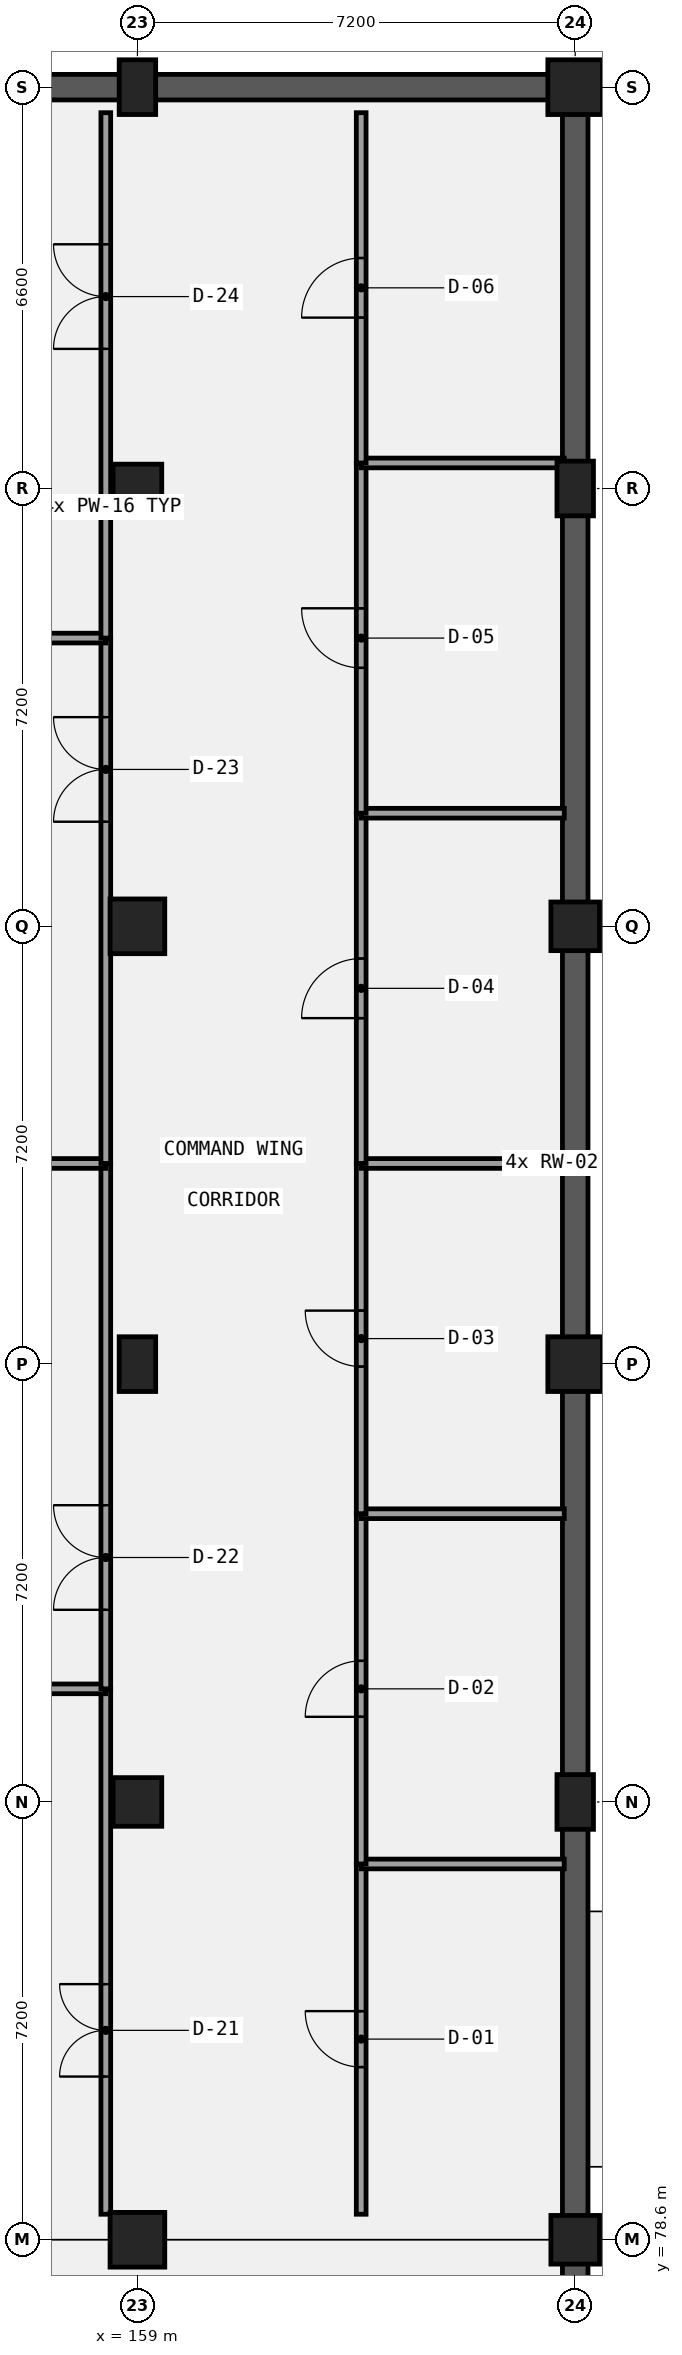
"""IFC4 building model, lengths in metres.
Left out: names, types, materials, properties, quantities, classifications, styles, units other than length and angle.
Written with IfcOpenShell. Run it as: python <this file> out.ifc"""

import sys

from ifc_helpers import new_model, si_unit, direction, frame, frame_2d, origin, origin_2d, place, context, subcontext, project, spatial, rectangle, extrude, element, fill, save


model = new_model("IFC4")
c1 = context("Model", 3, precision=1e-05, world=origin(), true_north=direction((0.0, 1.0)))
c2 = subcontext(c1, "Body", "Model", "MODEL_VIEW")
j1 = project(units=[si_unit("LENGTHUNIT", "METRE"), si_unit("PLANEANGLEUNIT", "RADIAN")], contexts=[c1])
p1 = place(None, origin())
s1 = spatial("IfcSite", under=j1, at=p1, CompositionType="ELEMENT")
p2 = place(p1, origin())
s2 = spatial("IfcBuilding", under=s1, at=p2, CompositionType="ELEMENT")
p3 = place(p2, frame((0.0, 0.0, -4.2)))
s3 = spatial("IfcBuildingStorey", under=s2, at=p3, CompositionType="ELEMENT", Elevation=-4.2)
p4 = place(p3, frame((144.39, 114.0, 0.0), z_axis=(0.0, 0.0, 1.0), x_axis=(1.0, 0.0, 0.0)))
e1 = element("IfcWall", 1, at=p4, inside=s3, PredefinedType="USERDEFINED", context=c2, shape_type="SweptSolid", body=[
    extrude(rectangle(XDim=22.02, YDim=0.42, at=frame_2d((11.01, 0.0))), origin(), (0.0, 0.0, 1.0), 3.13),
])
p5 = place(p3, frame((166.2, 113.8, 0.0), z_axis=(0.0, 0.0, 1.0), x_axis=(0.0, -1.0, 0.0)))
e2 = element("IfcWall", 2, at=p5, inside=s3, PredefinedType="USERDEFINED", context=c2, shape_type="SweptSolid", body=[
    extrude(rectangle(XDim=35.0, YDim=0.42, at=frame_2d((17.5, 0.0))), origin(), (0.0, 0.0, 1.0), 3.03),
])
p6 = place(p3, frame((166.2, 78.4, 0.0), z_axis=(0.0, 0.0, 1.0), x_axis=(0.0, -1.0, 0.0)))
e3 = element("IfcWall", 3, at=p6, inside=s3, PredefinedType="USERDEFINED", context=c2, shape_type="SweptSolid", body=[
    extrude(rectangle(XDim=28.37, YDim=0.42, at=frame_2d((14.185, 0.0))), origin(), (0.0, 0.0, 1.0), 2.88),
])
p7 = place(p3, frame((159.0, 78.6, 0.0), z_axis=(0.0, 0.0, 1.0), x_axis=(1.0, 0.0, 0.0)))
e4 = element("IfcColumn", 4, at=p7, inside=s3, PredefinedType="COLUMN", context=c2, shape_type="SweptSolid", body=[
    extrude(rectangle(XDim=0.9, YDim=0.9, at=origin_2d()), origin(), (0.0, 0.0, 1.0), 4.2),
])
p8 = place(p3, frame((159.0, 85.8, 0.0), z_axis=(0.0, 0.0, 1.0), x_axis=(1.0, 0.0, 0.0)))
e5 = element("IfcColumn", 5, at=p8, inside=s3, PredefinedType="COLUMN", context=c2, shape_type="SweptSolid", body=[
    extrude(rectangle(XDim=0.8, YDim=0.8, at=origin_2d()), origin(), (0.0, 0.0, 1.0), 4.2),
])
p9 = place(p3, frame((159.0, 93.0, 0.0), z_axis=(0.0, 0.0, 1.0), x_axis=(1.0, 0.0, 0.0)))
e6 = element("IfcColumn", 6, at=p9, inside=s3, PredefinedType="COLUMN", context=c2, shape_type="SweptSolid", body=[
    extrude(rectangle(XDim=0.6, YDim=0.9, at=origin_2d()), origin(), (0.0, 0.0, 1.0), 4.2),
])
p10 = place(p3, frame((159.0, 100.2, 0.0), z_axis=(0.0, 0.0, 1.0), x_axis=(1.0, 0.0, 0.0)))
e7 = element("IfcColumn", 7, at=p10, inside=s3, PredefinedType="COLUMN", context=c2, shape_type="SweptSolid", body=[
    extrude(rectangle(XDim=0.9, YDim=0.9, at=origin_2d()), origin(), (0.0, 0.0, 1.0), 4.2),
])
p11 = place(p3, frame((159.0, 107.4, 0.0), z_axis=(0.0, 0.0, 1.0), x_axis=(1.0, 0.0, 0.0)))
e8 = element("IfcColumn", 8, at=p11, inside=s3, PredefinedType="COLUMN", context=c2, shape_type="SweptSolid", body=[
    extrude(rectangle(XDim=0.8, YDim=0.8, at=origin_2d()), origin(), (0.0, 0.0, 1.0), 4.2),
])
p12 = place(p3, frame((159.0, 114.0, 0.0), z_axis=(0.0, 0.0, 1.0), x_axis=(1.0, 0.0, 0.0)))
e9 = element("IfcColumn", 9, at=p12, inside=s3, PredefinedType="COLUMN", context=c2, shape_type="SweptSolid", body=[
    extrude(rectangle(XDim=0.6, YDim=0.9, at=origin_2d()), origin(), (0.0, 0.0, 1.0), 4.2),
])
p13 = place(p3, frame((166.2, 78.6, 0.0), z_axis=(0.0, 0.0, 1.0), x_axis=(1.0, 0.0, 0.0)))
e10 = element("IfcColumn", 10, at=p13, inside=s3, PredefinedType="COLUMN", context=c2, shape_type="SweptSolid", body=[
    extrude(rectangle(XDim=0.8, YDim=0.8, at=origin_2d()), origin(), (0.0, 0.0, 1.0), 4.2),
])
p14 = place(p3, frame((166.2, 85.8, 0.0), z_axis=(0.0, 0.0, 1.0), x_axis=(1.0, 0.0, 0.0)))
e11 = element("IfcColumn", 11, at=p14, inside=s3, PredefinedType="COLUMN", context=c2, shape_type="SweptSolid", body=[
    extrude(rectangle(XDim=0.6, YDim=0.9, at=origin_2d()), origin(), (0.0, 0.0, 1.0), 4.2),
])
p15 = place(p3, frame((166.2, 93.0, 0.0), z_axis=(0.0, 0.0, 1.0), x_axis=(1.0, 0.0, 0.0)))
e12 = element("IfcColumn", 12, at=p15, inside=s3, PredefinedType="COLUMN", context=c2, shape_type="SweptSolid", body=[
    extrude(rectangle(XDim=0.9, YDim=0.9, at=origin_2d()), origin(), (0.0, 0.0, 1.0), 4.2),
])
p16 = place(p3, frame((166.2, 100.2, 0.0), z_axis=(0.0, 0.0, 1.0), x_axis=(1.0, 0.0, 0.0)))
e13 = element("IfcColumn", 13, at=p16, inside=s3, PredefinedType="COLUMN", context=c2, shape_type="SweptSolid", body=[
    extrude(rectangle(XDim=0.8, YDim=0.8, at=origin_2d()), origin(), (0.0, 0.0, 1.0), 4.2),
])
p17 = place(p3, frame((166.2, 107.4, 0.0), z_axis=(0.0, 0.0, 1.0), x_axis=(1.0, 0.0, 0.0)))
e14 = element("IfcColumn", 14, at=p17, inside=s3, PredefinedType="COLUMN", context=c2, shape_type="SweptSolid", body=[
    extrude(rectangle(XDim=0.6, YDim=0.9, at=origin_2d()), origin(), (0.0, 0.0, 1.0), 4.2),
])
p18 = place(p3, frame((166.2, 114.0, 0.0), z_axis=(0.0, 0.0, 1.0), x_axis=(1.0, 0.0, 0.0)))
e15 = element("IfcColumn", 15, at=p18, inside=s3, PredefinedType="COLUMN", context=c2, shape_type="SweptSolid", body=[
    extrude(rectangle(XDim=0.9, YDim=0.9, at=origin_2d()), origin(), (0.0, 0.0, 1.0), 4.2),
])
p19 = place(p3, frame((158.48, 79.02, 0.0), z_axis=(0.0, 0.0, 1.0), x_axis=(0.0, 1.0, 0.0)))
e16 = element("IfcWall", 16, at=p19, inside=s3, PredefinedType="PARTITIONING", context=c2, shape_type="SweptSolid", body=[
    extrude(rectangle(XDim=8.64, YDim=0.16, at=frame_2d((4.32, 0.0))), origin(), (0.0, 0.0, 1.0), 3.88),
])
p20 = place(p19, frame((2.264, 0.0, 0.0)))
e17 = element("IfcOpeningElement", 17, at=p20, cuts=e16, PredefinedType="OPENING", context=c2, shape_type="SweptSolid", body=[
    extrude(rectangle(XDim=1.52, YDim=2.35, at=frame_2d((0.76, 1.175))), frame((0.0, 0.09, 0.0), z_axis=(0.0, -1.0, 0.0), x_axis=(1.0, 0.0, 0.0)), (0.0, 0.0, 1.0), 0.18),
])
p21 = place(p3, frame((145.25, 87.66, 0.0), z_axis=(0.0, 0.0, 1.0), x_axis=(1.0, 0.0, 0.0)))
e18 = element("IfcWall", 18, at=p21, inside=s3, PredefinedType="PARTITIONING", context=c2, shape_type="SweptSolid", body=[
    extrude(rectangle(XDim=13.23, YDim=0.16, at=frame_2d((6.615, 0.0))), origin(), (0.0, 0.0, 1.0), 3.33),
])
p22 = place(p3, frame((158.48, 87.66, 0.0), z_axis=(0.0, 0.0, 1.0), x_axis=(0.0, 1.0, 0.0)))
e19 = element("IfcWall", 19, at=p22, inside=s3, PredefinedType="PARTITIONING", context=c2, shape_type="SweptSolid", body=[
    extrude(rectangle(XDim=8.64, YDim=0.16, at=frame_2d((4.32, 0.0))), origin(), (0.0, 0.0, 1.0), 3.88),
])
p23 = place(p22, frame((1.3, 0.0, 0.0)))
e20 = element("IfcOpeningElement", 20, at=p23, cuts=e19, PredefinedType="OPENING", context=c2, shape_type="SweptSolid", body=[
    extrude(rectangle(XDim=1.72, YDim=2.1, at=frame_2d((0.86, 1.05))), frame((0.0, 0.09, 0.0), z_axis=(0.0, -1.0, 0.0), x_axis=(1.0, 0.0, 0.0)), (0.0, 0.0, 1.0), 0.18),
])
p24 = place(p3, frame((145.25, 96.3, 0.0), z_axis=(0.0, 0.0, 1.0), x_axis=(1.0, 0.0, 0.0)))
e21 = element("IfcWall", 21, at=p24, inside=s3, PredefinedType="PARTITIONING", context=c2, shape_type="SweptSolid", body=[
    extrude(rectangle(XDim=13.23, YDim=0.16, at=frame_2d((6.615, 0.0))), origin(), (0.0, 0.0, 1.0), 3.88),
])
p25 = place(p3, frame((158.48, 96.3, 0.0), z_axis=(0.0, 0.0, 1.0), x_axis=(0.0, 1.0, 0.0)))
e22 = element("IfcWall", 22, at=p25, inside=s3, PredefinedType="PARTITIONING", context=c2, shape_type="SweptSolid", body=[
    extrude(rectangle(XDim=8.64, YDim=0.16, at=frame_2d((4.32, 0.0))), origin(), (0.0, 0.0, 1.0), 3.88),
])
p26 = place(p25, frame((5.62, 0.0, 0.0)))
e23 = element("IfcOpeningElement", 23, at=p26, cuts=e22, PredefinedType="OPENING", context=c2, shape_type="SweptSolid", body=[
    extrude(rectangle(XDim=1.72, YDim=2.22, at=frame_2d((0.86, 1.11))), frame((0.0, 0.09, 0.0), z_axis=(0.0, -1.0, 0.0), x_axis=(1.0, 0.0, 0.0)), (0.0, 0.0, 1.0), 0.18),
])
p27 = place(p3, frame((145.25, 104.94, 0.0), z_axis=(0.0, 0.0, 1.0), x_axis=(1.0, 0.0, 0.0)))
e24 = element("IfcWall", 24, at=p27, inside=s3, PredefinedType="PARTITIONING", context=c2, shape_type="SweptSolid", body=[
    extrude(rectangle(XDim=13.23, YDim=0.16, at=frame_2d((6.615, 0.0))), origin(), (0.0, 0.0, 1.0), 3.88),
])
p28 = place(p3, frame((158.48, 104.94, 0.0), z_axis=(0.0, 0.0, 1.0), x_axis=(0.0, 1.0, 0.0)))
e25 = element("IfcWall", 25, at=p28, inside=s3, PredefinedType="PARTITIONING", context=c2, shape_type="SweptSolid", body=[
    extrude(rectangle(XDim=8.64, YDim=0.16, at=frame_2d((4.32, 0.0))), origin(), (0.0, 0.0, 1.0), 3.88),
])
p29 = place(p28, frame((4.756, 0.0, 0.0)))
e26 = element("IfcOpeningElement", 26, at=p29, cuts=e25, PredefinedType="OPENING", context=c2, shape_type="SweptSolid", body=[
    extrude(rectangle(XDim=1.72, YDim=2.35, at=frame_2d((0.86, 1.175))), frame((0.0, 0.09, 0.0), z_axis=(0.0, -1.0, 0.0), x_axis=(1.0, 0.0, 0.0)), (0.0, 0.0, 1.0), 0.18),
])
p30 = place(p3, frame((162.68, 79.02, 0.0), z_axis=(0.0, 0.0, 1.0), x_axis=(0.0, 1.0, 0.0)))
e27 = element("IfcWall", 27, at=p30, inside=s3, PredefinedType="PARTITIONING", context=c2, shape_type="SweptSolid", body=[
    extrude(rectangle(XDim=5.76, YDim=0.16, at=frame_2d((2.88, 0.0))), origin(), (0.0, 0.0, 1.0), 3.88),
])
p31 = place(p30, frame((2.42, 0.0, 0.0)))
e28 = element("IfcOpeningElement", 28, at=p31, cuts=e27, PredefinedType="OPENING", context=c2, shape_type="SweptSolid", body=[
    extrude(rectangle(XDim=0.92, YDim=2.1, at=frame_2d((0.46, 1.05))), frame((0.0, 0.09, 0.0), z_axis=(0.0, -1.0, 0.0), x_axis=(1.0, 0.0, 0.0)), (0.0, 0.0, 1.0), 0.18),
])
p32 = place(p3, frame((162.68, 84.78, 0.0), z_axis=(0.0, 0.0, 1.0), x_axis=(1.0, 0.0, 0.0)))
e29 = element("IfcWall", 29, at=p32, inside=s3, PredefinedType="PARTITIONING", context=c2, shape_type="SweptSolid", body=[
    extrude(rectangle(XDim=3.34, YDim=0.16, at=frame_2d((1.67, 0.0))), origin(), (0.0, 0.0, 1.0), 3.88),
])
p33 = place(p3, frame((162.68, 84.78, 0.0), z_axis=(0.0, 0.0, 1.0), x_axis=(0.0, 1.0, 0.0)))
e30 = element("IfcWall", 30, at=p33, inside=s3, PredefinedType="PARTITIONING", context=c2, shape_type="SweptSolid", body=[
    extrude(rectangle(XDim=5.76, YDim=0.16, at=frame_2d((2.88, 0.0))), origin(), (0.0, 0.0, 1.0), 3.88),
])
p34 = place(p33, frame((2.42, 0.0, 0.0)))
e31 = element("IfcOpeningElement", 31, at=p34, cuts=e30, PredefinedType="OPENING", context=c2, shape_type="SweptSolid", body=[
    extrude(rectangle(XDim=0.92, YDim=2.22, at=frame_2d((0.46, 1.11))), frame((0.0, 0.09, 0.0), z_axis=(0.0, -1.0, 0.0), x_axis=(1.0, 0.0, 0.0)), (0.0, 0.0, 1.0), 0.18),
])
p35 = place(p3, frame((162.68, 90.54, 0.0), z_axis=(0.0, 0.0, 1.0), x_axis=(1.0, 0.0, 0.0)))
e32 = element("IfcWall", 32, at=p35, inside=s3, PredefinedType="PARTITIONING", context=c2, shape_type="SweptSolid", body=[
    extrude(rectangle(XDim=3.34, YDim=0.16, at=frame_2d((1.67, 0.0))), origin(), (0.0, 0.0, 1.0), 3.88),
])
p36 = place(p3, frame((162.68, 90.54, 0.0), z_axis=(0.0, 0.0, 1.0), x_axis=(0.0, 1.0, 0.0)))
e33 = element("IfcWall", 33, at=p36, inside=s3, PredefinedType="PARTITIONING", context=c2, shape_type="SweptSolid", body=[
    extrude(rectangle(XDim=5.76, YDim=0.16, at=frame_2d((2.88, 0.0))), origin(), (0.0, 0.0, 1.0), 3.88),
])
p37 = place(p36, frame((2.42, 0.0, 0.0)))
e34 = element("IfcOpeningElement", 34, at=p37, cuts=e33, PredefinedType="OPENING", context=c2, shape_type="SweptSolid", body=[
    extrude(rectangle(XDim=0.92, YDim=2.35, at=frame_2d((0.46, 1.175))), frame((0.0, 0.09, 0.0), z_axis=(0.0, -1.0, 0.0), x_axis=(1.0, 0.0, 0.0)), (0.0, 0.0, 1.0), 0.18),
])
p38 = place(p3, frame((162.68, 96.3, 0.0), z_axis=(0.0, 0.0, 1.0), x_axis=(1.0, 0.0, 0.0)))
e35 = element("IfcWall", 35, at=p38, inside=s3, PredefinedType="PARTITIONING", context=c2, shape_type="SweptSolid", body=[
    extrude(rectangle(XDim=3.34, YDim=0.16, at=frame_2d((1.67, 0.0))), origin(), (0.0, 0.0, 1.0), 3.88),
])
p39 = place(p3, frame((162.68, 96.3, 0.0), z_axis=(0.0, 0.0, 1.0), x_axis=(0.0, 1.0, 0.0)))
e36 = element("IfcWall", 36, at=p39, inside=s3, PredefinedType="PARTITIONING", context=c2, shape_type="SweptSolid", body=[
    extrude(rectangle(XDim=5.76, YDim=0.16, at=frame_2d((2.88, 0.0))), origin(), (0.0, 0.0, 1.0), 3.88),
])
p40 = place(p39, frame((2.39, 0.0, 0.0)))
e37 = element("IfcOpeningElement", 37, at=p40, cuts=e36, PredefinedType="OPENING", context=c2, shape_type="SweptSolid", body=[
    extrude(rectangle(XDim=0.98, YDim=2.1, at=frame_2d((0.49, 1.05))), frame((0.0, 0.09, 0.0), z_axis=(0.0, -1.0, 0.0), x_axis=(1.0, 0.0, 0.0)), (0.0, 0.0, 1.0), 0.18),
])
p41 = place(p3, frame((162.68, 102.06, 0.0), z_axis=(0.0, 0.0, 1.0), x_axis=(1.0, 0.0, 0.0)))
e38 = element("IfcWall", 38, at=p41, inside=s3, PredefinedType="PARTITIONING", context=c2, shape_type="SweptSolid", body=[
    extrude(rectangle(XDim=3.34, YDim=0.16, at=frame_2d((1.67, 0.0))), origin(), (0.0, 0.0, 1.0), 3.33),
])
p42 = place(p3, frame((162.68, 102.06, 0.0), z_axis=(0.0, 0.0, 1.0), x_axis=(0.0, 1.0, 0.0)))
e39 = element("IfcWall", 39, at=p42, inside=s3, PredefinedType="PARTITIONING", context=c2, shape_type="SweptSolid", body=[
    extrude(rectangle(XDim=5.76, YDim=0.16, at=frame_2d((2.88, 0.0))), origin(), (0.0, 0.0, 1.0), 3.88),
])
p43 = place(p42, frame((2.39, 0.0, 0.0)))
e40 = element("IfcOpeningElement", 40, at=p43, cuts=e39, PredefinedType="OPENING", context=c2, shape_type="SweptSolid", body=[
    extrude(rectangle(XDim=0.98, YDim=2.22, at=frame_2d((0.49, 1.11))), frame((0.0, 0.09, 0.0), z_axis=(0.0, -1.0, 0.0), x_axis=(1.0, 0.0, 0.0)), (0.0, 0.0, 1.0), 0.18),
])
p44 = place(p3, frame((162.68, 107.82, 0.0), z_axis=(0.0, 0.0, 1.0), x_axis=(1.0, 0.0, 0.0)))
e41 = element("IfcWall", 41, at=p44, inside=s3, PredefinedType="PARTITIONING", context=c2, shape_type="SweptSolid", body=[
    extrude(rectangle(XDim=3.34, YDim=0.16, at=frame_2d((1.67, 0.0))), origin(), (0.0, 0.0, 1.0), 3.88),
])
p45 = place(p3, frame((162.68, 107.82, 0.0), z_axis=(0.0, 0.0, 1.0), x_axis=(0.0, 1.0, 0.0)))
e42 = element("IfcWall", 42, at=p45, inside=s3, PredefinedType="PARTITIONING", context=c2, shape_type="SweptSolid", body=[
    extrude(rectangle(XDim=5.76, YDim=0.16, at=frame_2d((2.88, 0.0))), origin(), (0.0, 0.0, 1.0), 3.88),
])
p46 = place(p45, frame((2.39, 0.0, 0.0)))
e43 = element("IfcOpeningElement", 43, at=p46, cuts=e42, PredefinedType="OPENING", context=c2, shape_type="SweptSolid", body=[
    extrude(rectangle(XDim=0.98, YDim=2.35, at=frame_2d((0.49, 1.175))), frame((0.0, 0.09, 0.0), z_axis=(0.0, -1.0, 0.0), x_axis=(1.0, 0.0, 0.0)), (0.0, 0.0, 1.0), 0.18),
])
p47 = place(p20, frame((1.52, 0.0, 0.0), z_axis=(0.0, 0.0, 1.0), x_axis=(-1.0, 0.0, 0.0)))
e44 = element("IfcDoor", 44, at=p47, inside=s3, OperationType="DOUBLE_DOOR_SINGLE_SWING", PredefinedType="DOOR", context=c2, shape_type="SweptSolid", body=[
    extrude(rectangle(XDim=1.52, YDim=2.35, at=frame_2d((0.76, 1.175))), frame((0.0, 0.025, 0.0), z_axis=(0.0, -1.0, 0.0), x_axis=(1.0, 0.0, 0.0)), (0.0, 0.0, 1.0), 0.05),
])
fill(e17, e44)
p48 = place(p23, frame((1.72, 0.0, 0.0), z_axis=(0.0, 0.0, 1.0), x_axis=(-1.0, 0.0, 0.0)))
e45 = element("IfcDoor", 45, at=p48, inside=s3, OperationType="DOUBLE_DOOR_SINGLE_SWING", PredefinedType="DOOR", context=c2, shape_type="SweptSolid", body=[
    extrude(rectangle(XDim=1.72, YDim=2.1, at=frame_2d((0.86, 1.05))), frame((0.0, 0.025, 0.0), z_axis=(0.0, -1.0, 0.0), x_axis=(1.0, 0.0, 0.0)), (0.0, 0.0, 1.0), 0.05),
])
fill(e20, e45)
p49 = place(p26, frame((1.72, 0.0, 0.0), z_axis=(0.0, 0.0, 1.0), x_axis=(-1.0, 0.0, 0.0)))
e46 = element("IfcDoor", 46, at=p49, inside=s3, OperationType="DOUBLE_DOOR_SINGLE_SWING", PredefinedType="DOOR", context=c2, shape_type="SweptSolid", body=[
    extrude(rectangle(XDim=1.72, YDim=2.22, at=frame_2d((0.86, 1.11))), frame((0.0, 0.025, 0.0), z_axis=(0.0, -1.0, 0.0), x_axis=(1.0, 0.0, 0.0)), (0.0, 0.0, 1.0), 0.05),
])
fill(e23, e46)
p50 = place(p29, frame((1.72, 0.0, 0.0), z_axis=(0.0, 0.0, 1.0), x_axis=(-1.0, 0.0, 0.0)))
e47 = element("IfcDoor", 47, at=p50, inside=s3, OperationType="DOUBLE_DOOR_SINGLE_SWING", PredefinedType="DOOR", context=c2, shape_type="SweptSolid", body=[
    extrude(rectangle(XDim=1.72, YDim=2.35, at=frame_2d((0.86, 1.175))), frame((0.0, 0.025, 0.0), z_axis=(0.0, -1.0, 0.0), x_axis=(1.0, 0.0, 0.0)), (0.0, 0.0, 1.0), 0.05),
])
fill(e26, e47)
p51 = place(p31, origin())
e48 = element("IfcDoor", 48, at=p51, inside=s3, OperationType="SINGLE_SWING_RIGHT", PredefinedType="DOOR", context=c2, shape_type="SweptSolid", body=[
    extrude(rectangle(XDim=0.92, YDim=2.1, at=frame_2d((0.46, 1.05))), frame((0.0, 0.025, 0.0), z_axis=(0.0, -1.0, 0.0), x_axis=(1.0, 0.0, 0.0)), (0.0, 0.0, 1.0), 0.05),
])
fill(e28, e48)
p52 = place(p34, origin())
e49 = element("IfcDoor", 49, at=p52, inside=s3, OperationType="SINGLE_SWING_LEFT", PredefinedType="DOOR", context=c2, shape_type="SweptSolid", body=[
    extrude(rectangle(XDim=0.92, YDim=2.22, at=frame_2d((0.46, 1.11))), frame((0.0, 0.025, 0.0), z_axis=(0.0, -1.0, 0.0), x_axis=(1.0, 0.0, 0.0)), (0.0, 0.0, 1.0), 0.05),
])
fill(e31, e49)
p53 = place(p37, origin())
e50 = element("IfcDoor", 50, at=p53, inside=s3, OperationType="SINGLE_SWING_RIGHT", PredefinedType="DOOR", context=c2, shape_type="SweptSolid", body=[
    extrude(rectangle(XDim=0.92, YDim=2.35, at=frame_2d((0.46, 1.175))), frame((0.0, 0.025, 0.0), z_axis=(0.0, -1.0, 0.0), x_axis=(1.0, 0.0, 0.0)), (0.0, 0.0, 1.0), 0.05),
])
fill(e34, e50)
p54 = place(p40, origin())
e51 = element("IfcDoor", 51, at=p54, inside=s3, OperationType="SINGLE_SWING_LEFT", PredefinedType="DOOR", context=c2, shape_type="SweptSolid", body=[
    extrude(rectangle(XDim=0.98, YDim=2.1, at=frame_2d((0.49, 1.05))), frame((0.0, 0.025, 0.0), z_axis=(0.0, -1.0, 0.0), x_axis=(1.0, 0.0, 0.0)), (0.0, 0.0, 1.0), 0.05),
])
fill(e37, e51)
p55 = place(p43, origin())
e52 = element("IfcDoor", 52, at=p55, inside=s3, OperationType="SINGLE_SWING_RIGHT", PredefinedType="DOOR", context=c2, shape_type="SweptSolid", body=[
    extrude(rectangle(XDim=0.98, YDim=2.22, at=frame_2d((0.49, 1.11))), frame((0.0, 0.025, 0.0), z_axis=(0.0, -1.0, 0.0), x_axis=(1.0, 0.0, 0.0)), (0.0, 0.0, 1.0), 0.05),
])
fill(e40, e52)
p56 = place(p46, origin())
e53 = element("IfcDoor", 53, at=p56, inside=s3, OperationType="SINGLE_SWING_LEFT", PredefinedType="DOOR", context=c2, shape_type="SweptSolid", body=[
    extrude(rectangle(XDim=0.98, YDim=2.35, at=frame_2d((0.49, 1.175))), frame((0.0, 0.025, 0.0), z_axis=(0.0, -1.0, 0.0), x_axis=(1.0, 0.0, 0.0)), (0.0, 0.0, 1.0), 0.05),
])
fill(e43, e53)
save(model, sys.argv[1])
